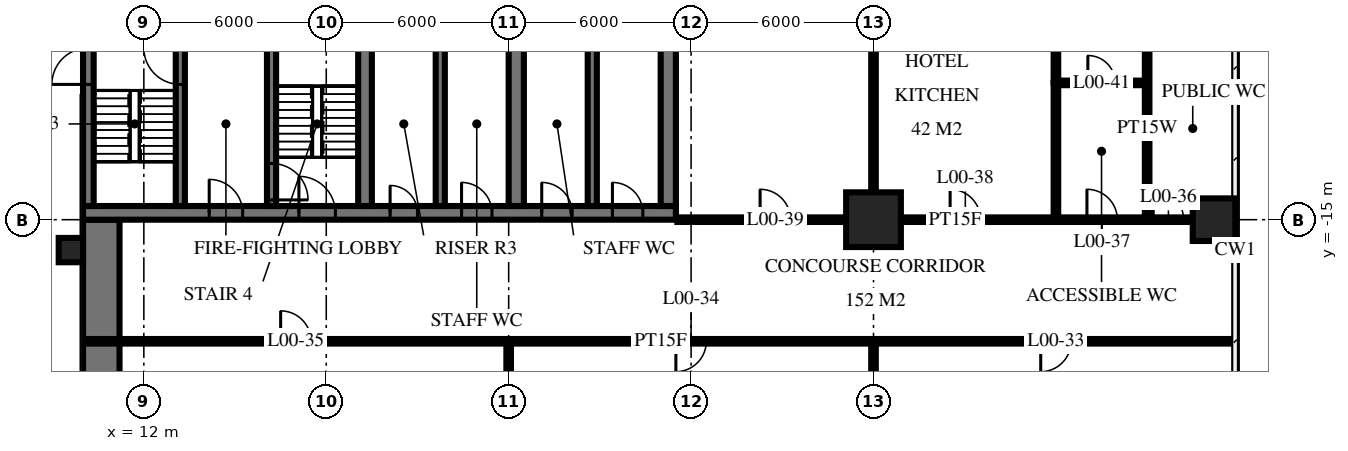
"""IFC4 building model, lengths in metres.
Left out: names, types, materials, properties, quantities, classifications, styles, units other than length and angle.
Written with IfcOpenShell. Run it as: python <this file> out.ifc"""

import sys

from ifc_helpers import new_model, si_unit, direction, frame, frame_2d, origin, origin_2d, place, context, subcontext, project, spatial, rectangle, circle, extrude, element, fill, save


model = new_model("IFC4")
c1 = context("Model", 3, precision=1e-05, world=origin(), true_north=direction((0.0, 1.0)))
c2 = subcontext(c1, "Body", "Model", "MODEL_VIEW")
j1 = project(units=[si_unit("LENGTHUNIT", "METRE"), si_unit("PLANEANGLEUNIT", "RADIAN")], contexts=[c1])
p1 = place(None, origin())
s1 = spatial("IfcSite", under=j1, at=p1, CompositionType="ELEMENT")
p2 = place(p1, origin())
s2 = spatial("IfcBuilding", under=s1, at=p2, CompositionType="ELEMENT")
p3 = place(p2, origin())
s3 = spatial("IfcBuildingStorey", under=s2, at=p3, CompositionType="ELEMENT", Elevation=0.0)
p4 = place(p3, frame((36.0, -15.0, -0.3), z_axis=(0.0, 0.0, 1.0), x_axis=(1.0, 0.0, 0.0)))
e1 = element("IfcColumn", 1, at=p4, inside=s3, PredefinedType="COLUMN", context=c2, shape_type="SweptSolid", body=[
    extrude(circle(Radius=0.9, at=origin_2d()), origin(), (0.0, 0.0, 1.0), 7.3),
])
p5 = place(p3, frame((47.2, -15.0, -0.3), z_axis=(0.0, 0.0, 1.0), x_axis=(1.0, 0.0, 0.0)))
e2 = element("IfcColumn", 2, at=p5, inside=s3, PredefinedType="COLUMN", context=c2, shape_type="SweptSolid", body=[
    extrude(circle(Radius=0.7, at=origin_2d()), origin(), (0.0, 0.0, 1.0), 7.3),
])
p6 = place(p3, frame((10.0, -14.775, -0.3), z_axis=(0.0, 0.0, 1.0), x_axis=(1.0, 0.0, 0.0)))
e3 = element("IfcWall", 3, at=p6, inside=s3, PredefinedType="SHEAR", context=c2, shape_type="SweptSolid", body=[
    extrude(rectangle(XDim=19.5, YDim=0.45, at=frame_2d((9.75, 0.0))), origin(), (0.0, 0.0, 1.0), 7.3),
])
p7 = place(p6, frame((7.1, 0.0, 0.3)))
e4 = element("IfcOpeningElement", 4, at=p7, cuts=e3, PredefinedType="OPENING", context=c2, shape_type="SweptSolid", body=[
    extrude(rectangle(XDim=1.2, YDim=2.1, at=frame_2d((0.6, 1.05))), frame((0.0, 0.235, 0.0), z_axis=(0.0, -1.0, 0.0), x_axis=(1.0, 0.0, 0.0)), (0.0, 0.0, 1.0), 0.47),
])
p8 = place(p6, frame((4.15, 0.0, 0.3)))
e5 = element("IfcOpeningElement", 5, at=p8, cuts=e3, PredefinedType="OPENING", context=c2, shape_type="SweptSolid", body=[
    extrude(rectangle(XDim=1.1, YDim=2.1, at=frame_2d((0.55, 1.05))), frame((0.0, 0.235, 0.0), z_axis=(0.0, -1.0, 0.0), x_axis=(1.0, 0.0, 0.0)), (0.0, 0.0, 1.0), 0.47),
])
p9 = place(p6, frame((10.1, 0.0, 0.3)))
e6 = element("IfcOpeningElement", 6, at=p9, cuts=e3, PredefinedType="OPENING", context=c2, shape_type="SweptSolid", body=[
    extrude(rectangle(XDim=0.9, YDim=2.1, at=frame_2d((0.45, 1.05))), frame((0.0, 0.235, 0.0), z_axis=(0.0, -1.0, 0.0), x_axis=(1.0, 0.0, 0.0)), (0.0, 0.0, 1.0), 0.47),
])
p10 = place(p6, frame((12.45, 0.0, 0.3)))
e7 = element("IfcOpeningElement", 7, at=p10, cuts=e3, PredefinedType="OPENING", context=c2, shape_type="SweptSolid", body=[
    extrude(rectangle(XDim=1.0, YDim=2.1, at=frame_2d((0.5, 1.05))), frame((0.0, 0.235, 0.0), z_axis=(0.0, -1.0, 0.0), x_axis=(1.0, 0.0, 0.0)), (0.0, 0.0, 1.0), 0.47),
])
p11 = place(p6, frame((15.087, 0.0, 0.3)))
e8 = element("IfcOpeningElement", 8, at=p11, cuts=e3, PredefinedType="OPENING", context=c2, shape_type="SweptSolid", body=[
    extrude(rectangle(XDim=1.0, YDim=2.1, at=frame_2d((0.5, 1.05))), frame((0.0, 0.235, 0.0), z_axis=(0.0, -1.0, 0.0), x_axis=(1.0, 0.0, 0.0)), (0.0, 0.0, 1.0), 0.47),
])
p12 = place(p6, frame((17.413, 0.0, 0.3)))
e9 = element("IfcOpeningElement", 9, at=p12, cuts=e3, PredefinedType="OPENING", context=c2, shape_type="SweptSolid", body=[
    extrude(rectangle(XDim=1.0, YDim=2.1, at=frame_2d((0.5, 1.05))), frame((0.0, 0.235, 0.0), z_axis=(0.0, -1.0, 0.0), x_axis=(1.0, 0.0, 0.0)), (0.0, 0.0, 1.0), 0.47),
])
p13 = place(p3, frame((10.175, -14.55, -0.3), z_axis=(0.0, 0.0, 1.0), x_axis=(0.0, 1.0, 0.0)))
e10 = element("IfcWall", 10, at=p13, inside=s3, PredefinedType="SHEAR", context=c2, shape_type="SweptSolid", body=[
    extrude(rectangle(XDim=14.1, YDim=0.35, at=frame_2d((7.05, 0.0))), origin(), (0.0, 0.0, 1.0), 7.3),
])
p14 = place(p13, frame((8.4, 0.0, 0.3)))
e11 = element("IfcOpeningElement", 11, at=p14, cuts=e10, PredefinedType="OPENING", context=c2, shape_type="SweptSolid", body=[
    extrude(rectangle(XDim=1.4, YDim=2.4, at=frame_2d((0.7, 1.2))), frame((0.0, 0.185, 0.0), z_axis=(0.0, -1.0, 0.0), x_axis=(1.0, 0.0, 0.0)), (0.0, 0.0, 1.0), 0.37),
])
p15 = place(p13, frame((10.0, 0.0, 0.3)))
e12 = element("IfcOpeningElement", 12, at=p15, cuts=e10, PredefinedType="OPENING", context=c2, shape_type="SweptSolid", body=[
    extrude(rectangle(XDim=1.4, YDim=2.4, at=frame_2d((0.7, 1.2))), frame((0.0, 0.185, 0.0), z_axis=(0.0, -1.0, 0.0), x_axis=(1.0, 0.0, 0.0)), (0.0, 0.0, 1.0), 0.37),
])
p16 = place(p13, frame((4.0, 0.0, 0.3)))
e13 = element("IfcOpeningElement", 13, at=p16, cuts=e10, PredefinedType="OPENING", context=c2, shape_type="SweptSolid", body=[
    extrude(rectangle(XDim=1.2, YDim=2.1, at=frame_2d((0.6, 1.05))), frame((0.0, 0.185, 0.0), z_axis=(0.0, -1.0, 0.0), x_axis=(1.0, 0.0, 0.0)), (0.0, 0.0, 1.0), 0.37),
])
p17 = place(p3, frame((29.25, -14.55, -0.3), z_axis=(0.0, 0.0, 1.0), x_axis=(0.0, 1.0, 0.0)))
e14 = element("IfcWall", 14, at=p17, inside=s3, PredefinedType="SHEAR", context=c2, shape_type="SweptSolid", body=[
    extrude(rectangle(XDim=14.1, YDim=0.5, at=frame_2d((7.05, 0.0))), origin(), (0.0, 0.0, 1.0), 7.3),
])
p18 = place(p3, frame((13.2, -14.55, -0.3), z_axis=(0.0, 0.0, 1.0), x_axis=(0.0, 1.0, 0.0)))
e15 = element("IfcWall", 15, at=p18, inside=s3, PredefinedType="SHEAR", context=c2, shape_type="SweptSolid", body=[
    extrude(rectangle(XDim=5.4, YDim=0.3, at=frame_2d((2.7, 0.0))), origin(), (0.0, 0.0, 1.0), 7.3),
])
p19 = place(p18, frame((4.0, 0.0, 0.3)))
e16 = element("IfcOpeningElement", 16, at=p19, cuts=e15, PredefinedType="OPENING", context=c2, shape_type="SweptSolid", body=[
    extrude(rectangle(XDim=1.2, YDim=2.1, at=frame_2d((0.6, 1.05))), frame((0.0, 0.16, 0.0), z_axis=(0.0, -1.0, 0.0), x_axis=(1.0, 0.0, 0.0)), (0.0, 0.0, 1.0), 0.32),
])
p20 = place(p3, frame((16.2, -14.55, -0.3), z_axis=(0.0, 0.0, 1.0), x_axis=(0.0, 1.0, 0.0)))
e17 = element("IfcWall", 17, at=p20, inside=s3, PredefinedType="SHEAR", context=c2, shape_type="SweptSolid", body=[
    extrude(rectangle(XDim=5.4, YDim=0.3, at=frame_2d((2.7, 0.0))), origin(), (0.0, 0.0, 1.0), 7.3),
])
p21 = place(p20, frame((0.2, 0.0, 0.3)))
e18 = element("IfcOpeningElement", 18, at=p21, cuts=e17, PredefinedType="OPENING", context=c2, shape_type="SweptSolid", body=[
    extrude(rectangle(XDim=1.2, YDim=2.1, at=frame_2d((0.6, 1.05))), frame((0.0, 0.16, 0.0), z_axis=(0.0, -1.0, 0.0), x_axis=(1.0, 0.0, 0.0)), (0.0, 0.0, 1.0), 0.32),
])
p22 = place(p3, frame((19.275, -14.55, -0.3), z_axis=(0.0, 0.0, 1.0), x_axis=(0.0, 1.0, 0.0)))
e19 = element("IfcWall", 19, at=p22, inside=s3, PredefinedType="SHEAR", context=c2, shape_type="SweptSolid", body=[
    extrude(rectangle(XDim=5.4, YDim=0.45, at=frame_2d((2.7, 0.0))), origin(), (0.0, 0.0, 1.0), 7.3),
])
p23 = place(p3, frame((21.75, -14.55, -0.3), z_axis=(0.0, 0.0, 1.0), x_axis=(0.0, 1.0, 0.0)))
e20 = element("IfcWall", 20, at=p23, inside=s3, PredefinedType="SHEAR", context=c2, shape_type="SweptSolid", body=[
    extrude(rectangle(XDim=5.4, YDim=0.3, at=frame_2d((2.7, 0.0))), origin(), (0.0, 0.0, 1.0), 7.3),
])
p24 = place(p3, frame((24.25, -14.55, -0.3), z_axis=(0.0, 0.0, 1.0), x_axis=(0.0, 1.0, 0.0)))
e21 = element("IfcWall", 21, at=p24, inside=s3, PredefinedType="SHEAR", context=c2, shape_type="SweptSolid", body=[
    extrude(rectangle(XDim=5.4, YDim=0.5, at=frame_2d((2.7, 0.0))), origin(), (0.0, 0.0, 1.0), 7.3),
])
p25 = place(p3, frame((26.75, -14.55, -0.3), z_axis=(0.0, 0.0, 1.0), x_axis=(0.0, 1.0, 0.0)))
e22 = element("IfcWall", 22, at=p25, inside=s3, PredefinedType="SHEAR", context=c2, shape_type="SweptSolid", body=[
    extrude(rectangle(XDim=5.4, YDim=0.3, at=frame_2d((2.7, 0.0))), origin(), (0.0, 0.0, 1.0), 7.3),
])
p26 = place(p3, frame((10.6, -40.0, -0.3), z_axis=(0.0, 0.0, 1.0), x_axis=(0.0, 1.0, 0.0)))
e23 = element("IfcWall", 23, at=p26, inside=s3, PredefinedType="SHEAR", context=c2, shape_type="SweptSolid", body=[
    extrude(rectangle(XDim=25.0, YDim=1.2, at=frame_2d((12.5, 0.0))), origin(), (0.0, 0.0, 1.0), 7.3),
])
p27 = place(p26, frame((8.8, 0.0, 0.3)))
e24 = element("IfcOpeningElement", 24, at=p27, cuts=e23, PredefinedType="OPENING", context=c2, shape_type="SweptSolid", body=[
    extrude(rectangle(XDim=2.4, YDim=2.7, at=frame_2d((1.2, 1.35))), frame((0.0, 0.61, 0.0), z_axis=(0.0, -1.0, 0.0), x_axis=(1.0, 0.0, 0.0)), (0.0, 0.0, 1.0), 1.22),
])
p28 = place(p3, frame((9.6, -16.0, -0.3), z_axis=(0.0, 0.0, 1.0), x_axis=(1.0, 0.0, 0.0)))
e25 = element("IfcColumn", 25, at=p28, inside=s3, PredefinedType="COLUMN", context=c2, shape_type="SweptSolid", body=[
    extrude(rectangle(XDim=0.8, YDim=0.8, at=origin_2d()), origin(), (0.0, 0.0, 1.0), 7.3),
])
p29 = place(p3, frame((45.0, -15.0, 0.0), z_axis=(0.0, 0.0, 1.0), x_axis=(0.0, 1.0, 0.0)))
e26 = element("IfcWall", 26, at=p29, inside=s3, PredefinedType="PLUMBINGWALL", context=c2, shape_type="SweptSolid", body=[
    extrude(rectangle(XDim=6.0, YDim=0.15, at=frame_2d((3.0, 0.0))), origin(), (0.0, 0.0, 1.0), 6.55),
])
p30 = place(p3, frame((42.0, -10.5, 0.0), z_axis=(0.0, 0.0, 1.0), x_axis=(0.0, 1.0, 0.0)))
e27 = element("IfcWall", 27, at=p30, inside=s3, PredefinedType="PARTITIONING", context=c2, shape_type="SweptSolid", body=[
    extrude(rectangle(XDim=18.316, YDim=0.15, at=frame_2d((9.158, 0.0))), origin(), (0.0, 0.0, 1.0), 6.55),
])
p31 = place(p3, frame((42.0, -15.0, 0.0), z_axis=(0.0, 0.0, 1.0), x_axis=(0.0, 1.0, 0.0)))
e28 = element("IfcWall", 28, at=p31, inside=s3, PredefinedType="PLUMBINGWALL", context=c2, shape_type="SweptSolid", body=[
    extrude(rectangle(XDim=4.5, YDim=0.15, at=frame_2d((2.25, 0.0))), origin(), (0.0, 0.0, 1.0), 6.55),
])
p32 = place(p3, frame((36.0, -39.82, 0.0), z_axis=(0.0, 0.0, 1.0), x_axis=(0.0, 1.0, 0.0)))
e29 = element("IfcWall", 29, at=p32, inside=s3, PredefinedType="PARTITIONING", context=c2, shape_type="SweptSolid", body=[
    extrude(rectangle(XDim=20.82, YDim=0.15, at=frame_2d((10.41, 0.0))), origin(), (0.0, 0.0, 1.0), 6.55),
])
p33 = place(p3, frame((36.0, -15.0, 0.0), z_axis=(0.0, 0.0, 1.0), x_axis=(0.0, 1.0, 0.0)))
e30 = element("IfcWall", 30, at=p33, inside=s3, PredefinedType="PARTITIONING", context=c2, shape_type="SweptSolid", body=[
    extrude(rectangle(XDim=22.82, YDim=0.15, at=frame_2d((11.41, 0.0))), origin(), (0.0, 0.0, 1.0), 6.55),
])
p34 = place(p3, frame((24.0, -39.82, 0.0), z_axis=(0.0, 0.0, 1.0), x_axis=(0.0, 1.0, 0.0)))
e31 = element("IfcWall", 31, at=p34, inside=s3, PredefinedType="PARTITIONING", context=c2, shape_type="SweptSolid", body=[
    extrude(rectangle(XDim=20.82, YDim=0.15, at=frame_2d((10.41, 0.0))), origin(), (0.0, 0.0, 1.0), 6.55),
])
p35 = place(p3, frame((10.18, -19.0, 0.0), z_axis=(0.0, 0.0, 1.0), x_axis=(1.0, 0.0, 0.0)))
e32 = element("IfcWall", 32, at=p35, inside=s3, PredefinedType="PARTITIONING", context=c2, shape_type="SweptSolid", body=[
    extrude(rectangle(XDim=37.64, YDim=0.15, at=frame_2d((18.82, 0.0))), origin(), (0.0, 0.0, 1.0), 6.55),
])
p36 = place(p35, frame((31.32, 0.0, 0.0)))
e33 = element("IfcOpeningElement", 33, at=p36, cuts=e32, PredefinedType="OPENING", context=c2, shape_type="SweptSolid", body=[
    extrude(rectangle(XDim=1.0, YDim=2.1, at=frame_2d((0.5, 1.05))), frame((0.0, 0.085, 0.0), z_axis=(0.0, -1.0, 0.0), x_axis=(1.0, 0.0, 0.0)), (0.0, 0.0, 1.0), 0.17),
])
p37 = place(p35, frame((19.32, 0.0, 0.0)))
e34 = element("IfcOpeningElement", 34, at=p37, cuts=e32, PredefinedType="OPENING", context=c2, shape_type="SweptSolid", body=[
    extrude(rectangle(XDim=1.0, YDim=2.1, at=frame_2d((0.5, 1.05))), frame((0.0, 0.085, 0.0), z_axis=(0.0, -1.0, 0.0), x_axis=(1.0, 0.0, 0.0)), (0.0, 0.0, 1.0), 0.17),
])
p38 = place(p35, frame((6.32, 0.0, 0.0)))
e35 = element("IfcOpeningElement", 35, at=p38, cuts=e32, PredefinedType="OPENING", context=c2, shape_type="SweptSolid", body=[
    extrude(rectangle(XDim=1.0, YDim=2.1, at=frame_2d((0.5, 1.05))), frame((0.0, 0.085, 0.0), z_axis=(0.0, -1.0, 0.0), x_axis=(1.0, 0.0, 0.0)), (0.0, 0.0, 1.0), 0.17),
])
p39 = place(p3, frame((29.55, -15.0, 0.0), z_axis=(0.0, 0.0, 1.0), x_axis=(1.0, 0.0, 0.0)))
e36 = element("IfcWall", 36, at=p39, inside=s3, PredefinedType="PARTITIONING", context=c2, shape_type="SweptSolid", body=[
    extrude(rectangle(XDim=18.27, YDim=0.15, at=frame_2d((9.135, 0.0))), origin(), (0.0, 0.0, 1.0), 6.55),
])
p40 = place(p39, frame((15.65, 0.0, 0.0)))
e37 = element("IfcOpeningElement", 37, at=p40, cuts=e36, PredefinedType="OPENING", context=c2, shape_type="SweptSolid", body=[
    extrude(rectangle(XDim=1.0, YDim=2.1, at=frame_2d((0.5, 1.05))), frame((0.0, 0.085, 0.0), z_axis=(0.0, -1.0, 0.0), x_axis=(1.0, 0.0, 0.0)), (0.0, 0.0, 1.0), 0.17),
])
p41 = place(p39, frame((13.47, 0.0, 0.0)))
e38 = element("IfcOpeningElement", 38, at=p41, cuts=e36, PredefinedType="OPENING", context=c2, shape_type="SweptSolid", body=[
    extrude(rectangle(XDim=1.0, YDim=2.1, at=frame_2d((0.5, 1.05))), frame((0.0, 0.085, 0.0), z_axis=(0.0, -1.0, 0.0), x_axis=(1.0, 0.0, 0.0)), (0.0, 0.0, 1.0), 0.17),
])
p42 = place(p39, frame((8.97, 0.0, 0.0)))
e39 = element("IfcOpeningElement", 39, at=p42, cuts=e36, PredefinedType="OPENING", context=c2, shape_type="SweptSolid", body=[
    extrude(rectangle(XDim=1.0, YDim=2.1, at=frame_2d((0.5, 1.05))), frame((0.0, 0.085, 0.0), z_axis=(0.0, -1.0, 0.0), x_axis=(1.0, 0.0, 0.0)), (0.0, 0.0, 1.0), 0.17),
])
p43 = place(p39, frame((2.72, 0.0, 0.0)))
e40 = element("IfcOpeningElement", 40, at=p43, cuts=e36, PredefinedType="OPENING", context=c2, shape_type="SweptSolid", body=[
    extrude(rectangle(XDim=1.0, YDim=2.1, at=frame_2d((0.5, 1.05))), frame((0.0, 0.085, 0.0), z_axis=(0.0, -1.0, 0.0), x_axis=(1.0, 0.0, 0.0)), (0.0, 0.0, 1.0), 0.17),
])
p44 = place(p3, frame((42.0, -10.5, 0.0), z_axis=(0.0, 0.0, 1.0), x_axis=(1.0, 0.0, 0.0)))
e41 = element("IfcWall", 41, at=p44, inside=s3, PredefinedType="PLUMBINGWALL", context=c2, shape_type="SweptSolid", body=[
    extrude(rectangle(XDim=3.0, YDim=0.15, at=frame_2d((1.5, 0.0))), origin(), (0.0, 0.0, 1.0), 6.55),
])
p45 = place(p44, frame((1.05, 0.0, 0.0)))
e42 = element("IfcOpeningElement", 42, at=p45, cuts=e41, PredefinedType="OPENING", context=c2, shape_type="SweptSolid", body=[
    extrude(rectangle(XDim=0.9, YDim=2.1, at=frame_2d((0.45, 1.05))), frame((0.0, 0.085, 0.0), z_axis=(0.0, -1.0, 0.0), x_axis=(1.0, 0.0, 0.0)), (0.0, 0.0, 1.0), 0.17),
])
p46 = place(p16, origin())
e43 = element("IfcDoor", 43, at=p46, inside=s3, OperationType="SINGLE_SWING_RIGHT", PredefinedType="DOOR", context=c2, shape_type="SweptSolid", body=[
    extrude(rectangle(XDim=1.2, YDim=2.1, at=frame_2d((0.6, 1.05))), frame((0.0, 0.025, 0.0), z_axis=(0.0, -1.0, 0.0), x_axis=(1.0, 0.0, 0.0)), (0.0, 0.0, 1.0), 0.05),
])
fill(e13, e43)
p47 = place(p7, origin())
e44 = element("IfcDoor", 44, at=p47, inside=s3, OperationType="SINGLE_SWING_RIGHT", PredefinedType="DOOR", context=c2, shape_type="SweptSolid", body=[
    extrude(rectangle(XDim=1.2, YDim=2.1, at=frame_2d((0.6, 1.05))), frame((0.0, 0.025, 0.0), z_axis=(0.0, -1.0, 0.0), x_axis=(1.0, 0.0, 0.0)), (0.0, 0.0, 1.0), 0.05),
])
fill(e4, e44)
p48 = place(p8, origin())
e45 = element("IfcDoor", 45, at=p48, inside=s3, OperationType="SINGLE_SWING_RIGHT", PredefinedType="DOOR", context=c2, shape_type="SweptSolid", body=[
    extrude(rectangle(XDim=1.1, YDim=2.1, at=frame_2d((0.55, 1.05))), frame((0.0, 0.025, 0.0), z_axis=(0.0, -1.0, 0.0), x_axis=(1.0, 0.0, 0.0)), (0.0, 0.0, 1.0), 0.05),
])
fill(e5, e45)
p49 = place(p9, origin())
e46 = element("IfcDoor", 46, at=p49, inside=s3, OperationType="SINGLE_SWING_RIGHT", PredefinedType="DOOR", context=c2, shape_type="SweptSolid", body=[
    extrude(rectangle(XDim=0.9, YDim=2.1, at=frame_2d((0.45, 1.05))), frame((0.0, 0.025, 0.0), z_axis=(0.0, -1.0, 0.0), x_axis=(1.0, 0.0, 0.0)), (0.0, 0.0, 1.0), 0.05),
])
fill(e6, e46)
p50 = place(p10, origin())
e47 = element("IfcDoor", 47, at=p50, inside=s3, OperationType="SINGLE_SWING_RIGHT", PredefinedType="DOOR", context=c2, shape_type="SweptSolid", body=[
    extrude(rectangle(XDim=1.0, YDim=2.1, at=frame_2d((0.5, 1.05))), frame((0.0, 0.025, 0.0), z_axis=(0.0, -1.0, 0.0), x_axis=(1.0, 0.0, 0.0)), (0.0, 0.0, 1.0), 0.05),
])
fill(e7, e47)
p51 = place(p11, origin())
e48 = element("IfcDoor", 48, at=p51, inside=s3, OperationType="SINGLE_SWING_RIGHT", PredefinedType="DOOR", context=c2, shape_type="SweptSolid", body=[
    extrude(rectangle(XDim=1.0, YDim=2.1, at=frame_2d((0.5, 1.05))), frame((0.0, 0.025, 0.0), z_axis=(0.0, -1.0, 0.0), x_axis=(1.0, 0.0, 0.0)), (0.0, 0.0, 1.0), 0.05),
])
fill(e8, e48)
p52 = place(p12, origin())
e49 = element("IfcDoor", 49, at=p52, inside=s3, OperationType="SINGLE_SWING_RIGHT", PredefinedType="DOOR", context=c2, shape_type="SweptSolid", body=[
    extrude(rectangle(XDim=1.0, YDim=2.1, at=frame_2d((0.5, 1.05))), frame((0.0, 0.025, 0.0), z_axis=(0.0, -1.0, 0.0), x_axis=(1.0, 0.0, 0.0)), (0.0, 0.0, 1.0), 0.05),
])
fill(e9, e49)
p53 = place(p19, origin())
e50 = element("IfcDoor", 50, at=p53, inside=s3, OperationType="SINGLE_SWING_LEFT", PredefinedType="DOOR", context=c2, shape_type="SweptSolid", body=[
    extrude(rectangle(XDim=1.2, YDim=2.1, at=frame_2d((0.6, 1.05))), frame((0.0, 0.025, 0.0), z_axis=(0.0, -1.0, 0.0), x_axis=(1.0, 0.0, 0.0)), (0.0, 0.0, 1.0), 0.05),
])
fill(e16, e50)
p54 = place(p21, frame((0.6, 0.0, 0.0), z_axis=(0.0, 0.0, 1.0), x_axis=(-1.0, 0.0, 0.0)))
e51 = element("IfcDoor", 51, at=p54, inside=s3, OperationType="SINGLE_SWING_LEFT", PredefinedType="DOOR", context=c2, shape_type="SweptSolid", body=[
    extrude(rectangle(XDim=1.2, YDim=2.1, at=frame_2d((0.0, 1.05))), frame((0.0, -0.025, 0.0), z_axis=(0.0, 1.0, 0.0), x_axis=(-1.0, 0.0, 0.0)), (0.0, 0.0, 1.0), 0.05),
])
fill(e18, e51)
p55 = place(p36, frame((0.5, 0.0, 0.0), z_axis=(0.0, 0.0, 1.0), x_axis=(-1.0, 0.0, 0.0)))
e52 = element("IfcDoor", 52, at=p55, inside=s3, OperationType="SINGLE_SWING_LEFT", PredefinedType="DOOR", context=c2, shape_type="SweptSolid", body=[
    extrude(rectangle(XDim=1.0, YDim=2.1, at=frame_2d((0.0, 1.05))), frame((0.0, -0.025, 0.0), z_axis=(0.0, 1.0, 0.0), x_axis=(-1.0, 0.0, 0.0)), (0.0, 0.0, 1.0), 0.05),
])
fill(e33, e52)
p56 = place(p37, frame((0.5, 0.0, 0.0), z_axis=(0.0, 0.0, 1.0), x_axis=(-1.0, 0.0, 0.0)))
e53 = element("IfcDoor", 53, at=p56, inside=s3, OperationType="SINGLE_SWING_LEFT", PredefinedType="DOOR", context=c2, shape_type="SweptSolid", body=[
    extrude(rectangle(XDim=1.0, YDim=2.1, at=frame_2d((0.0, 1.05))), frame((0.0, -0.025, 0.0), z_axis=(0.0, 1.0, 0.0), x_axis=(-1.0, 0.0, 0.0)), (0.0, 0.0, 1.0), 0.05),
])
fill(e34, e53)
p57 = place(p38, origin())
e54 = element("IfcDoor", 54, at=p57, inside=s3, OperationType="SINGLE_SWING_RIGHT", PredefinedType="DOOR", context=c2, shape_type="SweptSolid", body=[
    extrude(rectangle(XDim=1.0, YDim=2.1, at=frame_2d((0.5, 1.05))), frame((0.0, 0.025, 0.0), z_axis=(0.0, -1.0, 0.0), x_axis=(1.0, 0.0, 0.0)), (0.0, 0.0, 1.0), 0.05),
])
fill(e35, e54)
p58 = place(p40, origin())
e55 = element("IfcDoor", 55, at=p58, inside=s3, OperationType="SINGLE_SWING_RIGHT", PredefinedType="DOOR", context=c2, shape_type="SweptSolid", body=[
    extrude(rectangle(XDim=1.0, YDim=2.1, at=frame_2d((0.5, 1.05))), frame((0.0, 0.025, 0.0), z_axis=(0.0, -1.0, 0.0), x_axis=(1.0, 0.0, 0.0)), (0.0, 0.0, 1.0), 0.05),
])
fill(e37, e55)
p59 = place(p41, origin())
e56 = element("IfcDoor", 56, at=p59, inside=s3, OperationType="SINGLE_SWING_RIGHT", PredefinedType="DOOR", context=c2, shape_type="SweptSolid", body=[
    extrude(rectangle(XDim=1.0, YDim=2.1, at=frame_2d((0.5, 1.05))), frame((0.0, 0.025, 0.0), z_axis=(0.0, -1.0, 0.0), x_axis=(1.0, 0.0, 0.0)), (0.0, 0.0, 1.0), 0.05),
])
fill(e38, e56)
p60 = place(p42, origin())
e57 = element("IfcDoor", 57, at=p60, inside=s3, OperationType="SINGLE_SWING_RIGHT", PredefinedType="DOOR", context=c2, shape_type="SweptSolid", body=[
    extrude(rectangle(XDim=1.0, YDim=2.1, at=frame_2d((0.5, 1.05))), frame((0.0, 0.025, 0.0), z_axis=(0.0, -1.0, 0.0), x_axis=(1.0, 0.0, 0.0)), (0.0, 0.0, 1.0), 0.05),
])
fill(e39, e57)
p61 = place(p43, origin())
e58 = element("IfcDoor", 58, at=p61, inside=s3, OperationType="SINGLE_SWING_RIGHT", PredefinedType="DOOR", context=c2, shape_type="SweptSolid", body=[
    extrude(rectangle(XDim=1.0, YDim=2.1, at=frame_2d((0.5, 1.05))), frame((0.0, 0.025, 0.0), z_axis=(0.0, -1.0, 0.0), x_axis=(1.0, 0.0, 0.0)), (0.0, 0.0, 1.0), 0.05),
])
fill(e40, e58)
p62 = place(p45, origin())
e59 = element("IfcDoor", 59, at=p62, inside=s3, OperationType="SINGLE_SWING_RIGHT", PredefinedType="DOOR", context=c2, shape_type="SweptSolid", body=[
    extrude(rectangle(XDim=0.9, YDim=2.1, at=frame_2d((0.45, 1.05))), frame((0.0, 0.025, 0.0), z_axis=(0.0, -1.0, 0.0), x_axis=(1.0, 0.0, 0.0)), (0.0, 0.0, 1.0), 0.05),
])
fill(e42, e59)
save(model, sys.argv[1])
